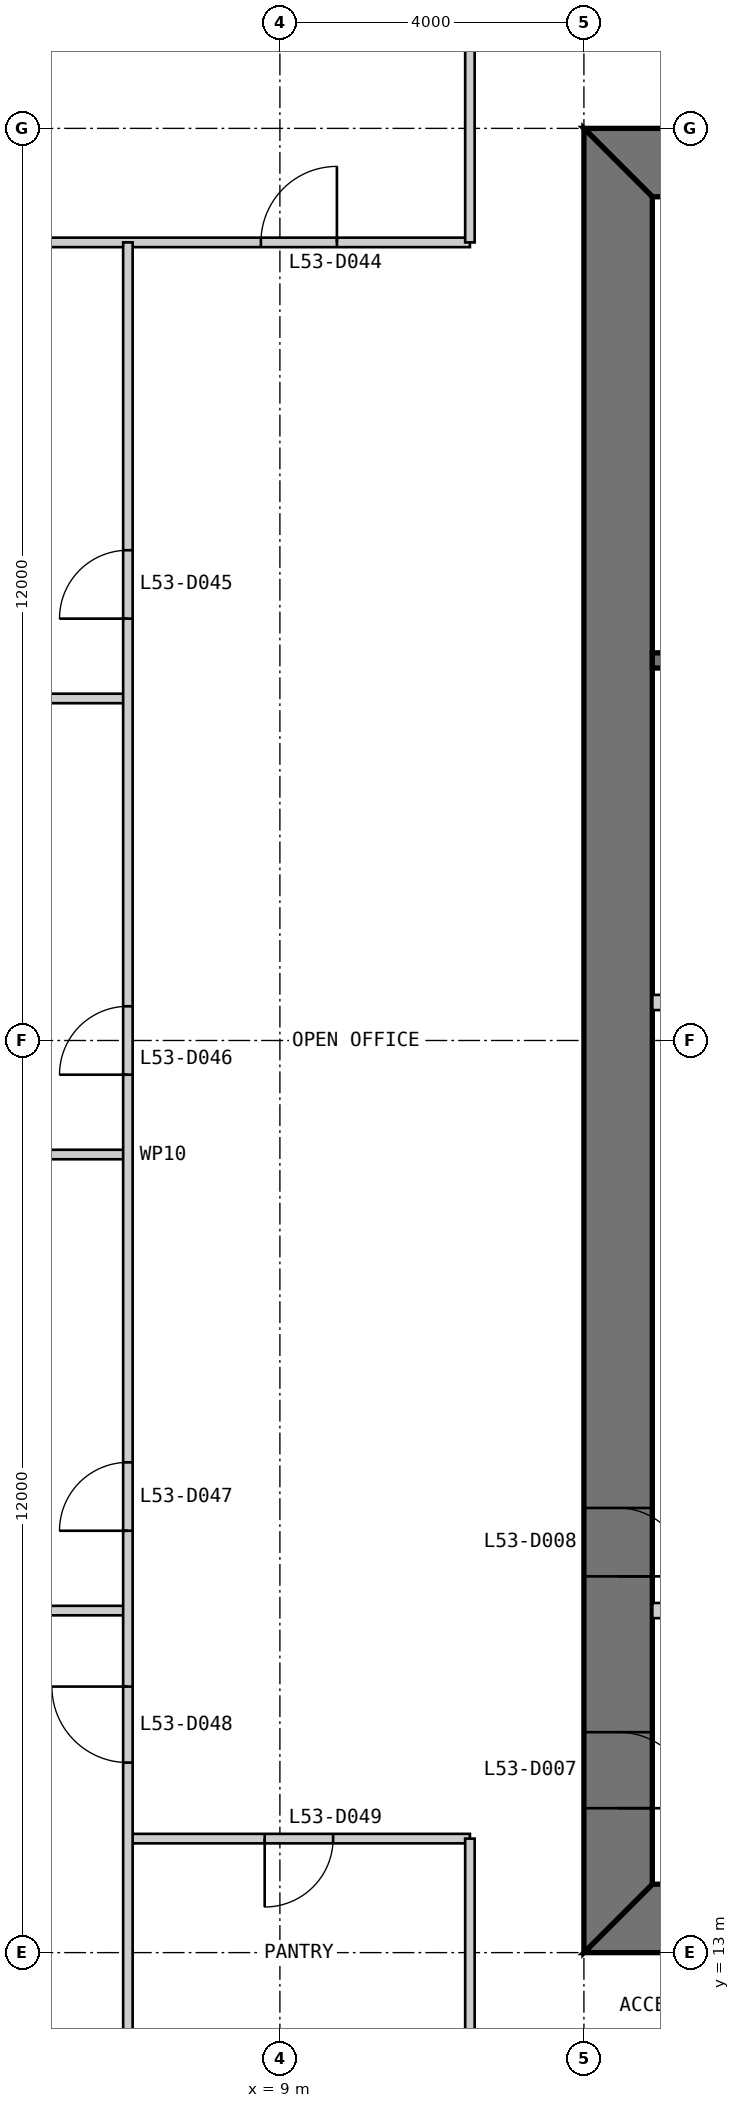
"""IFC4 building model, lengths in metres.
Left out: names, types, materials, properties, quantities, classifications, styles, units other than length and angle.
Written with IfcOpenShell. Run it as: python <this file> out.ifc"""

import sys

from ifc_helpers import new_model, si_unit, direction, frame, frame_2d, origin, place, context, subcontext, project, spatial, polyline, rectangle, outline, extrude, element, fill, save


model = new_model("IFC4")
c1 = context("Model", 3, precision=1e-05, world=origin(), true_north=direction((0.0, 1.0)))
c2 = subcontext(c1, "Body", "Model", "MODEL_VIEW")
j1 = project(units=[si_unit("LENGTHUNIT", "METRE"), si_unit("PLANEANGLEUNIT", "RADIAN")], contexts=[c1])
p1 = place(None, origin())
s1 = spatial("IfcSite", under=j1, at=p1, CompositionType="ELEMENT")
p2 = place(p1, origin())
s2 = spatial("IfcBuilding", under=s1, at=p2, CompositionType="ELEMENT")
p3 = place(p2, frame((0.0, 0.0, 225.8)))
s3 = spatial("IfcBuildingStorey", under=s2, at=p3, CompositionType="ELEMENT", Elevation=225.8)
p4 = place(p3, frame((13.0, 13.45, 0.0), z_axis=(0.0, 0.0, 1.0), x_axis=(1.0, 0.0, 0.0)))
e1 = element("IfcWall", 1, at=p4, inside=s3, PredefinedType="SHEAR", context=c2, shape_type="SweptSolid", body=[
    extrude(outline(polyline([(0.0, -0.45), (24.0, -0.45), (23.1, 0.45), (0.9, 0.45), (0.0, -0.45)])), origin(), (0.0, 0.0, 1.0), 4.0),
])
p5 = place(p4, frame((4.9, 0.0, 0.0)))
e2 = element("IfcOpeningElement", 2, at=p5, cuts=e1, PredefinedType="OPENING", context=c2, shape_type="SweptSolid", body=[
    extrude(rectangle(XDim=1.0, YDim=2.2, at=frame_2d((0.5, 1.1))), frame((0.0, 0.46, 0.0), z_axis=(0.0, -1.0, 0.0), x_axis=(1.0, 0.0, 0.0)), (0.0, 0.0, 1.0), 0.92),
])
p6 = place(p4, frame((8.9, 0.0, 0.0)))
e3 = element("IfcOpeningElement", 3, at=p6, cuts=e1, PredefinedType="OPENING", context=c2, shape_type="SweptSolid", body=[
    extrude(rectangle(XDim=1.1, YDim=2.2, at=frame_2d((0.55, 1.1))), frame((0.0, 0.46, 0.0), z_axis=(0.0, -1.0, 0.0), x_axis=(1.0, 0.0, 0.0)), (0.0, 0.0, 1.0), 0.92),
])
p7 = place(p4, frame((15.05, 0.0, 0.0)))
e4 = element("IfcOpeningElement", 4, at=p7, cuts=e1, PredefinedType="OPENING", context=c2, shape_type="SweptSolid", body=[
    extrude(rectangle(XDim=0.9, YDim=2.2, at=frame_2d((0.45, 1.1))), frame((0.0, 0.46, 0.0), z_axis=(0.0, -1.0, 0.0), x_axis=(1.0, 0.0, 0.0)), (0.0, 0.0, 1.0), 0.92),
])
p8 = place(p4, frame((17.9, 0.0, 0.0)))
e5 = element("IfcOpeningElement", 5, at=p8, cuts=e1, PredefinedType="OPENING", context=c2, shape_type="SweptSolid", body=[
    extrude(rectangle(XDim=1.0, YDim=2.2, at=frame_2d((0.5, 1.1))), frame((0.0, 0.46, 0.0), z_axis=(0.0, -1.0, 0.0), x_axis=(1.0, 0.0, 0.0)), (0.0, 0.0, 1.0), 0.92),
])
p9 = place(p4, frame((21.4, 0.0, 0.0)))
e6 = element("IfcOpeningElement", 6, at=p9, cuts=e1, PredefinedType="OPENING", context=c2, shape_type="SweptSolid", body=[
    extrude(rectangle(XDim=1.0, YDim=2.2, at=frame_2d((0.5, 1.1))), frame((0.0, 0.46, 0.0), z_axis=(0.0, -1.0, 0.0), x_axis=(1.0, 0.0, 0.0)), (0.0, 0.0, 1.0), 0.92),
])
p10 = place(p3, frame((37.0, 36.55, 0.0), z_axis=(0.0, 0.0, 1.0), x_axis=(-1.0, 0.0, 0.0)))
e7 = element("IfcWall", 7, at=p10, inside=s3, PredefinedType="SHEAR", context=c2, shape_type="SweptSolid", body=[
    extrude(outline(polyline([(0.0, -0.45), (24.0, -0.45), (23.1, 0.45), (0.9, 0.45), (0.0, -0.45)])), origin(), (0.0, 0.0, 1.0), 4.0),
])
p11 = place(p10, frame((4.9, 0.0, 0.0)))
e8 = element("IfcOpeningElement", 8, at=p11, cuts=e7, PredefinedType="OPENING", context=c2, shape_type="SweptSolid", body=[
    extrude(rectangle(XDim=1.0, YDim=2.2, at=frame_2d((0.5, 1.1))), frame((0.0, 0.46, 0.0), z_axis=(0.0, -1.0, 0.0), x_axis=(1.0, 0.0, 0.0)), (0.0, 0.0, 1.0), 0.92),
])
p12 = place(p10, frame((8.9, 0.0, 0.0)))
e9 = element("IfcOpeningElement", 9, at=p12, cuts=e7, PredefinedType="OPENING", context=c2, shape_type="SweptSolid", body=[
    extrude(rectangle(XDim=1.1, YDim=2.2, at=frame_2d((0.55, 1.1))), frame((0.0, 0.46, 0.0), z_axis=(0.0, -1.0, 0.0), x_axis=(1.0, 0.0, 0.0)), (0.0, 0.0, 1.0), 0.92),
])
p13 = place(p10, frame((15.05, 0.0, 0.0)))
e10 = element("IfcOpeningElement", 10, at=p13, cuts=e7, PredefinedType="OPENING", context=c2, shape_type="SweptSolid", body=[
    extrude(rectangle(XDim=0.9, YDim=2.2, at=frame_2d((0.45, 1.1))), frame((0.0, 0.46, 0.0), z_axis=(0.0, -1.0, 0.0), x_axis=(1.0, 0.0, 0.0)), (0.0, 0.0, 1.0), 0.92),
])
p14 = place(p10, frame((17.9, 0.0, 0.0)))
e11 = element("IfcOpeningElement", 11, at=p14, cuts=e7, PredefinedType="OPENING", context=c2, shape_type="SweptSolid", body=[
    extrude(rectangle(XDim=1.0, YDim=2.2, at=frame_2d((0.5, 1.1))), frame((0.0, 0.46, 0.0), z_axis=(0.0, -1.0, 0.0), x_axis=(1.0, 0.0, 0.0)), (0.0, 0.0, 1.0), 0.92),
])
p15 = place(p10, frame((21.4, 0.0, 0.0)))
e12 = element("IfcOpeningElement", 12, at=p15, cuts=e7, PredefinedType="OPENING", context=c2, shape_type="SweptSolid", body=[
    extrude(rectangle(XDim=1.0, YDim=2.2, at=frame_2d((0.5, 1.1))), frame((0.0, 0.46, 0.0), z_axis=(0.0, -1.0, 0.0), x_axis=(1.0, 0.0, 0.0)), (0.0, 0.0, 1.0), 0.92),
])
p16 = place(p3, frame((13.45, 36.1, 0.0), z_axis=(0.0, 0.0, 1.0), x_axis=(0.0, -1.0, 0.0)))
e13 = element("IfcWall", 13, at=p16, inside=s3, PredefinedType="SHEAR", context=c2, shape_type="SweptSolid", body=[
    extrude(outline(polyline([(-0.9, -0.45), (23.1, -0.45), (22.2, 0.45), (0.0, 0.45), (-0.9, -0.45)])), origin(), (0.0, 0.0, 1.0), 4.0),
])
p17 = place(p16, frame((20.2, 0.0, 0.0)))
e14 = element("IfcOpeningElement", 14, at=p17, cuts=e13, PredefinedType="OPENING", context=c2, shape_type="SweptSolid", body=[
    extrude(rectangle(XDim=1.0, YDim=2.2, at=frame_2d((0.5, 1.1))), frame((0.0, 0.46, 0.0), z_axis=(0.0, -1.0, 0.0), x_axis=(1.0, 0.0, 0.0)), (0.0, 0.0, 1.0), 0.92),
])
p18 = place(p16, frame((17.25, 0.0, 0.0)))
e15 = element("IfcOpeningElement", 15, at=p18, cuts=e13, PredefinedType="OPENING", context=c2, shape_type="SweptSolid", body=[
    extrude(rectangle(XDim=0.9, YDim=2.2, at=frame_2d((0.45, 1.1))), frame((0.0, 0.46, 0.0), z_axis=(0.0, -1.0, 0.0), x_axis=(1.0, 0.0, 0.0)), (0.0, 0.0, 1.0), 0.92),
])
for number, where, z_axis, x_axis in (
    (16, (13.9, 17.5, 0.0), (0.0, 0.0, 1.0), (1.0, 0.0, 0.0)),
    (17, (13.9, 25.5, 0.0), (0.0, 0.0, 1.0), (1.0, 0.0, 0.0)),
):
    element("IfcWall", number, at=place(p3, frame(where, z_axis=z_axis, x_axis=x_axis)), inside=s3, PredefinedType="PARTITIONING", context=c2, shape_type="SweptSolid", body=[
        extrude(rectangle(XDim=2.8, YDim=0.2, at=frame_2d((1.4, 0.0))), origin(), (0.0, 0.0, 1.0), 3.8),
    ])
p19 = place(p3, frame((29.7, 30.0, 0.0), z_axis=(0.0, 0.0, 1.0), x_axis=(-1.0, 0.0, 0.0)))
e18 = element("IfcWall", 18, at=p19, inside=s3, PredefinedType="SOLIDWALL", context=c2, shape_type="SweptSolid", body=[
    extrude(rectangle(XDim=15.8, YDim=0.2, at=frame_2d((7.9, 0.0))), origin(), (0.0, 0.0, 1.0), 3.8),
])
p20 = place(p3, frame((0.15, 35.5, 0.0), z_axis=(0.0, 0.0, 1.0), x_axis=(1.0, 0.0, 0.0)))
e19 = element("IfcWall", 19, at=p20, inside=s3, PredefinedType="PARTITIONING", context=c2, shape_type="SweptSolid", body=[
    extrude(rectangle(XDim=11.35, YDim=0.125, at=frame_2d((5.675, 0.0))), origin(), (0.0, 0.0, 1.0), 3.85),
])
p21 = place(p20, frame((8.6, 0.0, 0.0)))
e20 = element("IfcOpeningElement", 20, at=p21, cuts=e19, PredefinedType="OPENING", context=c2, shape_type="SweptSolid", body=[
    extrude(rectangle(XDim=1.0, YDim=2.2, at=frame_2d((0.5, 1.1))), frame((0.0, 0.073, 0.0), z_axis=(0.0, -1.0, 0.0), x_axis=(1.0, 0.0, 0.0)), (0.0, 0.0, 1.0), 0.145),
])
for number, where, z_axis, x_axis in (
    (21, (0.15, 29.5, 0.0), (0.0, 0.0, 1.0), (1.0, 0.0, 0.0)),
    (22, (0.15, 23.5, 0.0), (0.0, 0.0, 1.0), (1.0, 0.0, 0.0)),
    (23, (0.15, 17.5, 0.0), (0.0, 0.0, 1.0), (1.0, 0.0, 0.0)),
):
    element("IfcWall", number, at=place(p3, frame(where, z_axis=z_axis, x_axis=x_axis)), inside=s3, PredefinedType="PARTITIONING", context=c2, shape_type="SweptSolid", body=[
        extrude(rectangle(XDim=6.85, YDim=0.125, at=frame_2d((3.425, 0.0))), origin(), (0.0, 0.0, 1.0), 3.85),
    ])
p22 = place(p3, frame((7.0, 14.5, 0.0), z_axis=(0.0, 0.0, 1.0), x_axis=(1.0, 0.0, 0.0)))
e24 = element("IfcWall", 24, at=p22, inside=s3, PredefinedType="PARTITIONING", context=c2, shape_type="SweptSolid", body=[
    extrude(rectangle(XDim=4.5, YDim=0.125, at=frame_2d((2.25, 0.0))), origin(), (0.0, 0.0, 1.0), 3.85),
])
p23 = place(p22, frame((1.8, 0.0, 0.0)))
e25 = element("IfcOpeningElement", 25, at=p23, cuts=e24, PredefinedType="OPENING", context=c2, shape_type="SweptSolid", body=[
    extrude(rectangle(XDim=0.9, YDim=2.2, at=frame_2d((0.45, 1.1))), frame((0.0, 0.073, 0.0), z_axis=(0.0, -1.0, 0.0), x_axis=(1.0, 0.0, 0.0)), (0.0, 0.0, 1.0), 0.145),
])
p24 = place(p3, frame((7.0, 35.5, 0.0), z_axis=(0.0, 0.0, 1.0), x_axis=(0.0, -1.0, 0.0)))
e26 = element("IfcWall", 26, at=p24, inside=s3, PredefinedType="PARTITIONING", context=c2, shape_type="SweptSolid", body=[
    extrude(rectangle(XDim=24.0, YDim=0.125, at=frame_2d((12.0, 0.0))), origin(), (0.0, 0.0, 1.0), 3.238),
])
p25 = place(p24, frame((4.05, 0.0, 0.0)))
e27 = element("IfcOpeningElement", 27, at=p25, cuts=e26, PredefinedType="OPENING", context=c2, shape_type="SweptSolid", body=[
    extrude(rectangle(XDim=0.9, YDim=2.2, at=frame_2d((0.45, 1.1))), frame((0.0, 0.073, 0.0), z_axis=(0.0, -1.0, 0.0), x_axis=(1.0, 0.0, 0.0)), (0.0, 0.0, 1.0), 0.145),
])
p26 = place(p24, frame((10.05, 0.0, 0.0)))
e28 = element("IfcOpeningElement", 28, at=p26, cuts=e26, PredefinedType="OPENING", context=c2, shape_type="SweptSolid", body=[
    extrude(rectangle(XDim=0.9, YDim=2.2, at=frame_2d((0.45, 1.1))), frame((0.0, 0.073, 0.0), z_axis=(0.0, -1.0, 0.0), x_axis=(1.0, 0.0, 0.0)), (0.0, 0.0, 1.0), 0.145),
])
p27 = place(p24, frame((16.05, 0.0, 0.0)))
e29 = element("IfcOpeningElement", 29, at=p27, cuts=e26, PredefinedType="OPENING", context=c2, shape_type="SweptSolid", body=[
    extrude(rectangle(XDim=0.9, YDim=2.2, at=frame_2d((0.45, 1.1))), frame((0.0, 0.073, 0.0), z_axis=(0.0, -1.0, 0.0), x_axis=(1.0, 0.0, 0.0)), (0.0, 0.0, 1.0), 0.145),
])
p28 = place(p24, frame((19.0, 0.0, 0.0)))
e30 = element("IfcOpeningElement", 30, at=p28, cuts=e26, PredefinedType="OPENING", context=c2, shape_type="SweptSolid", body=[
    extrude(rectangle(XDim=1.0, YDim=2.2, at=frame_2d((0.5, 1.1))), frame((0.0, 0.073, 0.0), z_axis=(0.0, -1.0, 0.0), x_axis=(1.0, 0.0, 0.0)), (0.0, 0.0, 1.0), 0.145),
])
for number, where, z_axis, x_axis in (
    (31, (11.5, 38.5, 0.0), (0.0, 0.0, 1.0), (0.0, -1.0, 0.0)),
    (32, (11.5, 14.5, 0.0), (0.0, 0.0, 1.0), (0.0, -1.0, 0.0)),
):
    element("IfcWall", number, at=place(p3, frame(where, z_axis=z_axis, x_axis=x_axis)), inside=s3, PredefinedType="PARTITIONING", context=c2, shape_type="SweptSolid", body=[
        extrude(rectangle(XDim=3.0, YDim=0.125, at=frame_2d((1.5, 0.0))), origin(), (0.0, 0.0, 1.0), 3.85),
    ])
p29 = place(p17, origin())
e33 = element("IfcDoor", 33, at=p29, inside=s3, OperationType="SINGLE_SWING_RIGHT", PredefinedType="DOOR", context=c2, shape_type="SweptSolid", body=[
    extrude(rectangle(XDim=1.0, YDim=2.2, at=frame_2d((0.5, 1.1))), frame((0.0, 0.025, 0.0), z_axis=(0.0, -1.0, 0.0), x_axis=(1.0, 0.0, 0.0)), (0.0, 0.0, 1.0), 0.05),
    extrude(outline(polyline([(0.0, 0.0), (0.04, 0.0), (0.04, 2.16), (0.96, 2.16), (0.96, 0.0), (1.0, 0.0), (1.0, 2.2), (0.0, 2.2), (0.0, 0.0)])), frame((0.0, 0.3, 0.0), z_axis=(0.0, -1.0, 0.0), x_axis=(1.0, 0.0, 0.0)), (0.0, 0.0, 1.0), 0.6),
])
fill(e14, e33)
p30 = place(p18, origin())
e34 = element("IfcDoor", 34, at=p30, inside=s3, OperationType="SINGLE_SWING_RIGHT", PredefinedType="DOOR", context=c2, shape_type="SweptSolid", body=[
    extrude(rectangle(XDim=0.9, YDim=2.2, at=frame_2d((0.45, 1.1))), frame((0.0, 0.025, 0.0), z_axis=(0.0, -1.0, 0.0), x_axis=(1.0, 0.0, 0.0)), (0.0, 0.0, 1.0), 0.05),
    extrude(outline(polyline([(0.0, 0.0), (0.04, 0.0), (0.04, 2.16), (0.86, 2.16), (0.86, 0.0), (0.9, 0.0), (0.9, 2.2), (0.0, 2.2), (0.0, 0.0)])), frame((0.0, 0.3, 0.0), z_axis=(0.0, -1.0, 0.0), x_axis=(1.0, 0.0, 0.0)), (0.0, 0.0, 1.0), 0.6),
])
fill(e15, e34)
p31 = place(p21, origin())
e35 = element("IfcDoor", 35, at=p31, inside=s3, OperationType="SINGLE_SWING_RIGHT", PredefinedType="DOOR", context=c2, shape_type="SweptSolid", body=[
    extrude(rectangle(XDim=1.0, YDim=2.2, at=frame_2d((0.5, 1.1))), frame((0.0, 0.025, 0.0), z_axis=(0.0, -1.0, 0.0), x_axis=(1.0, 0.0, 0.0)), (0.0, 0.0, 1.0), 0.05),
])
fill(e20, e35)
p32 = place(p25, frame((0.9, 0.0, 0.0), z_axis=(0.0, 0.0, 1.0), x_axis=(-1.0, 0.0, 0.0)))
e36 = element("IfcDoor", 36, at=p32, inside=s3, OperationType="SINGLE_SWING_LEFT", PredefinedType="DOOR", context=c2, shape_type="SweptSolid", body=[
    extrude(rectangle(XDim=0.9, YDim=2.2, at=frame_2d((0.45, 1.1))), frame((0.0, 0.025, 0.0), z_axis=(0.0, -1.0, 0.0), x_axis=(1.0, 0.0, 0.0)), (0.0, 0.0, 1.0), 0.05),
])
fill(e27, e36)
p33 = place(p26, frame((0.9, 0.0, 0.0), z_axis=(0.0, 0.0, 1.0), x_axis=(-1.0, 0.0, 0.0)))
e37 = element("IfcDoor", 37, at=p33, inside=s3, OperationType="SINGLE_SWING_LEFT", PredefinedType="DOOR", context=c2, shape_type="SweptSolid", body=[
    extrude(rectangle(XDim=0.9, YDim=2.2, at=frame_2d((0.45, 1.1))), frame((0.0, 0.025, 0.0), z_axis=(0.0, -1.0, 0.0), x_axis=(1.0, 0.0, 0.0)), (0.0, 0.0, 1.0), 0.05),
])
fill(e28, e37)
p34 = place(p27, frame((0.9, 0.0, 0.0), z_axis=(0.0, 0.0, 1.0), x_axis=(-1.0, 0.0, 0.0)))
e38 = element("IfcDoor", 38, at=p34, inside=s3, OperationType="SINGLE_SWING_LEFT", PredefinedType="DOOR", context=c2, shape_type="SweptSolid", body=[
    extrude(rectangle(XDim=0.9, YDim=2.2, at=frame_2d((0.45, 1.1))), frame((0.0, 0.025, 0.0), z_axis=(0.0, -1.0, 0.0), x_axis=(1.0, 0.0, 0.0)), (0.0, 0.0, 1.0), 0.05),
])
fill(e29, e38)
p35 = place(p28, frame((1.0, 0.0, 0.0), z_axis=(0.0, 0.0, 1.0), x_axis=(-1.0, 0.0, 0.0)))
e39 = element("IfcDoor", 39, at=p35, inside=s3, OperationType="SINGLE_SWING_RIGHT", PredefinedType="DOOR", context=c2, shape_type="SweptSolid", body=[
    extrude(rectangle(XDim=1.0, YDim=2.2, at=frame_2d((0.5, 1.1))), frame((0.0, 0.025, 0.0), z_axis=(0.0, -1.0, 0.0), x_axis=(1.0, 0.0, 0.0)), (0.0, 0.0, 1.0), 0.05),
])
fill(e30, e39)
p36 = place(p23, frame((0.9, 0.0, 0.0), z_axis=(0.0, 0.0, 1.0), x_axis=(-1.0, 0.0, 0.0)))
e40 = element("IfcDoor", 40, at=p36, inside=s3, OperationType="SINGLE_SWING_RIGHT", PredefinedType="DOOR", context=c2, shape_type="SweptSolid", body=[
    extrude(rectangle(XDim=0.9, YDim=2.2, at=frame_2d((0.45, 1.1))), frame((0.0, 0.025, 0.0), z_axis=(0.0, -1.0, 0.0), x_axis=(1.0, 0.0, 0.0)), (0.0, 0.0, 1.0), 0.05),
])
fill(e25, e40)
save(model, sys.argv[1])
